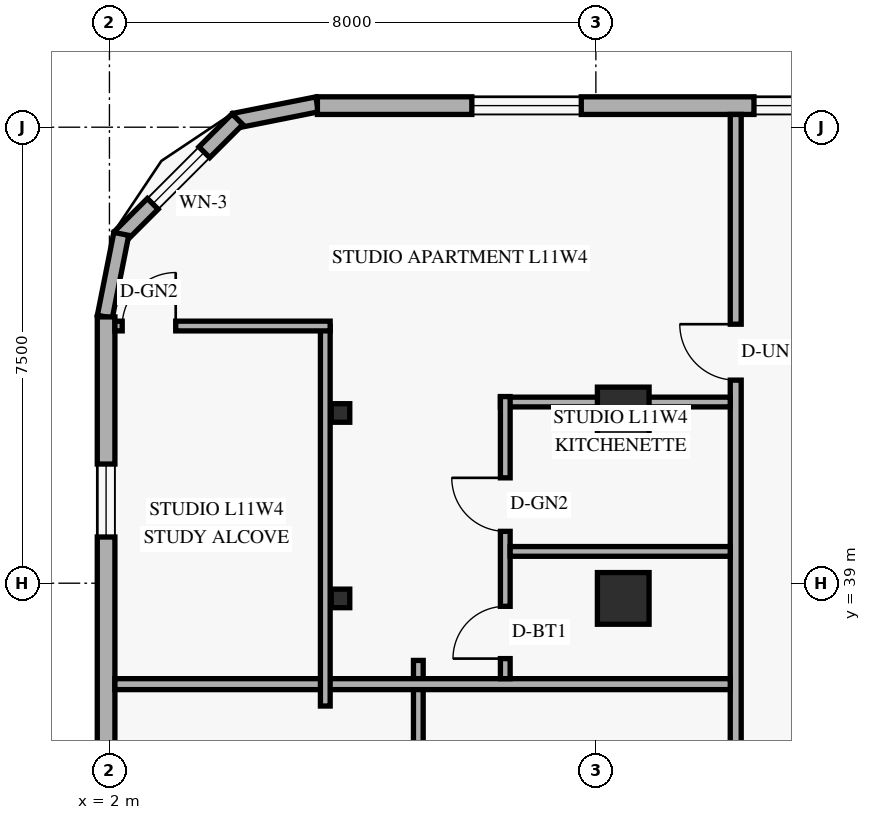
"""IFC4 building model, lengths in metres.
Left out: names, types, materials, properties, quantities, classifications, styles, units other than length and angle.
Written with IfcOpenShell. Run it as: python <this file> out.ifc"""

import sys

from ifc_helpers import new_model, si_unit, direction, frame, frame_2d, origin, origin_2d, place, context, subcontext, project, spatial, rectangle, hollow_rectangle, extrude, element, fill, save


model = new_model("IFC4")
c1 = context("Model", 3, precision=1e-05, world=origin(), true_north=direction((0.0, 1.0)))
c2 = subcontext(c1, "Body", "Model", "MODEL_VIEW")
j1 = project(units=[si_unit("LENGTHUNIT", "METRE"), si_unit("PLANEANGLEUNIT", "RADIAN")], contexts=[c1])
p1 = place(None, origin())
s1 = spatial("IfcSite", under=j1, at=p1, CompositionType="ELEMENT")
p2 = place(p1, origin())
s2 = spatial("IfcBuilding", under=s1, at=p2, CompositionType="ELEMENT")
p3 = place(p2, frame((0.0, 0.0, 45.6)))
s3 = spatial("IfcBuildingStorey", under=s2, at=p3, CompositionType="ELEMENT", Elevation=45.6)
for number, where, z_axis, x_axis in (
    (1, (5.8, 38.75, 0.0), (0.0, 0.0, 1.0), (1.0, 0.0, 0.0)),
    (2, (5.8, 41.8, 0.0), (0.0, 0.0, 1.0), (1.0, 0.0, 0.0)),
):
    element("IfcColumn", number, at=place(p3, frame(where, z_axis=z_axis, x_axis=x_axis)), inside=s3, PredefinedType="COLUMN", context=c2, shape_type="SweptSolid", body=[
        extrude(hollow_rectangle(XDim=0.305, YDim=0.305, WallThickness=0.013, at=origin_2d()), origin(), (0.0, 0.0, 1.0), 3.6),
    ])
for number, where, z_axis, x_axis in (
    (3, (10.45, 38.75, 0.0), (0.0, 0.0, 1.0), (1.0, 0.0, 0.0)),
    (4, (10.45, 41.8, 0.0), (0.0, 0.0, 1.0), (1.0, 0.0, 0.0)),
):
    element("IfcColumn", number, at=place(p3, frame(where, z_axis=z_axis, x_axis=x_axis)), inside=s3, PredefinedType="COLUMN", context=c2, shape_type="SweptSolid", body=[
        extrude(rectangle(XDim=0.85, YDim=0.85, at=origin_2d()), origin(), (0.0, 0.0, 1.0), 3.6),
    ])
p4 = place(p3, frame((5.417, 46.876, 0.0), z_axis=(0.0, 0.0, 1.0), x_axis=(-0.980809899341, -0.19496651342, 0.0)))
e5 = element("IfcWall", 5, at=p4, inside=s3, PredefinedType="SOLIDWALL", context=c2, shape_type="SweptSolid", body=[
    extrude(rectangle(XDim=1.389, YDim=0.25, at=frame_2d((0.694, 0.0))), origin(), (0.0, 0.0, 1.0), 3.36),
])
p5 = place(p3, frame((4.105, 46.632, 0.0), z_axis=(0.0, 0.0, 1.0), x_axis=(-0.707106781187, -0.707106781187, 0.0)))
e6 = element("IfcWall", 6, at=p5, inside=s3, PredefinedType="SOLIDWALL", context=c2, shape_type="SweptSolid", body=[
    extrude(rectangle(XDim=2.739, YDim=0.25, at=frame_2d((1.37, 0.0))), origin(), (0.0, 0.0, 1.0), 3.36),
])
p6 = place(p5, frame((0.77, 0.0, 0.85)))
e7 = element("IfcOpeningElement", 7, at=p6, cuts=e6, PredefinedType="OPENING", context=c2, shape_type="SweptSolid", body=[
    extrude(rectangle(XDim=1.2, YDim=1.5, at=frame_2d((0.6, 0.75))), frame((0.0, 0.135, 0.0), z_axis=(0.0, -1.0, 0.0), x_axis=(1.0, 0.0, 0.0)), (0.0, 0.0, 1.0), 0.27),
])
p7 = place(p3, frame((2.195, 44.746, 0.0), z_axis=(0.0, 0.0, 1.0), x_axis=(-0.19496651342, -0.980809899341, 0.0)))
e8 = element("IfcWall", 8, at=p7, inside=s3, PredefinedType="SOLIDWALL", context=c2, shape_type="SweptSolid", body=[
    extrude(rectangle(XDim=1.389, YDim=0.25, at=frame_2d((0.694, 0.0))), origin(), (0.0, 0.0, 1.0), 3.36),
])
p8 = place(p3, frame((44.98, 46.855, 0.0), z_axis=(0.0, 0.0, 1.0), x_axis=(-1.0, 0.0, 0.0)))
e9 = element("IfcWall", 9, at=p8, inside=s3, PredefinedType="SOLIDWALL", context=c2, shape_type="SweptSolid", body=[
    extrude(rectangle(XDim=39.56, YDim=0.29, at=frame_2d((19.78, 0.0))), origin(), (0.0, 0.0, 1.0), 3.36),
])
p9 = place(p8, frame((35.22, 0.0, 0.85)))
e10 = element("IfcOpeningElement", 10, at=p9, cuts=e9, PredefinedType="OPENING", context=c2, shape_type="SweptSolid", body=[
    extrude(rectangle(XDim=1.8, YDim=1.6, at=frame_2d((0.9, 0.8))), frame((0.0, 0.155, 0.0), z_axis=(0.0, -1.0, 0.0), x_axis=(1.0, 0.0, 0.0)), (0.0, 0.0, 1.0), 0.31),
])
p10 = place(p8, frame((31.18, 0.0, 0.85)))
e11 = element("IfcOpeningElement", 11, at=p10, cuts=e9, PredefinedType="OPENING", context=c2, shape_type="SweptSolid", body=[
    extrude(rectangle(XDim=1.2, YDim=1.5, at=frame_2d((0.6, 0.75))), frame((0.0, 0.155, 0.0), z_axis=(0.0, -1.0, 0.0), x_axis=(1.0, 0.0, 0.0)), (0.0, 0.0, 1.0), 0.31),
])
p11 = place(p8, frame((24.863, 0.0, 0.85)))
e12 = element("IfcOpeningElement", 12, at=p11, cuts=e9, PredefinedType="OPENING", context=c2, shape_type="SweptSolid", body=[
    extrude(rectangle(XDim=1.8, YDim=1.6, at=frame_2d((0.9, 0.8))), frame((0.0, 0.155, 0.0), z_axis=(0.0, -1.0, 0.0), x_axis=(1.0, 0.0, 0.0)), (0.0, 0.0, 1.0), 0.31),
])
p12 = place(p8, frame((16.273, 0.0, 0.85)))
e13 = element("IfcOpeningElement", 13, at=p12, cuts=e9, PredefinedType="OPENING", context=c2, shape_type="SweptSolid", body=[
    extrude(rectangle(XDim=1.8, YDim=1.6, at=frame_2d((0.9, 0.8))), frame((0.0, 0.155, 0.0), z_axis=(0.0, -1.0, 0.0), x_axis=(1.0, 0.0, 0.0)), (0.0, 0.0, 1.0), 0.31),
])
p13 = place(p8, frame((10.73, 0.0, 0.85)))
e14 = element("IfcOpeningElement", 14, at=p13, cuts=e9, PredefinedType="OPENING", context=c2, shape_type="SweptSolid", body=[
    extrude(rectangle(XDim=1.8, YDim=1.6, at=frame_2d((0.9, 0.8))), frame((0.0, 0.155, 0.0), z_axis=(0.0, -1.0, 0.0), x_axis=(1.0, 0.0, 0.0)), (0.0, 0.0, 1.0), 0.31),
])
p14 = place(p8, frame((7.895, 0.0, 0.85)))
e15 = element("IfcOpeningElement", 15, at=p14, cuts=e9, PredefinedType="OPENING", context=c2, shape_type="SweptSolid", body=[
    extrude(rectangle(XDim=1.2, YDim=1.5, at=frame_2d((0.6, 0.75))), frame((0.0, 0.155, 0.0), z_axis=(0.0, -1.0, 0.0), x_axis=(1.0, 0.0, 0.0)), (0.0, 0.0, 1.0), 0.31),
])
p15 = place(p8, frame((3.782, 0.0, 0.85)))
e16 = element("IfcOpeningElement", 16, at=p15, cuts=e9, PredefinedType="OPENING", context=c2, shape_type="SweptSolid", body=[
    extrude(rectangle(XDim=1.8, YDim=1.6, at=frame_2d((0.9, 0.8))), frame((0.0, 0.155, 0.0), z_axis=(0.0, -1.0, 0.0), x_axis=(1.0, 0.0, 0.0)), (0.0, 0.0, 1.0), 0.31),
])
p16 = place(p8, frame((0.367, 0.0, 0.85)))
e17 = element("IfcOpeningElement", 17, at=p16, cuts=e9, PredefinedType="OPENING", context=c2, shape_type="SweptSolid", body=[
    extrude(rectangle(XDim=1.2, YDim=1.5, at=frame_2d((0.6, 0.75))), frame((0.0, 0.155, 0.0), z_axis=(0.0, -1.0, 0.0), x_axis=(1.0, 0.0, 0.0)), (0.0, 0.0, 1.0), 0.31),
])
p17 = place(p3, frame((1.945, 43.38, 0.0), z_axis=(0.0, 0.0, 1.0), x_axis=(0.0, -1.0, 0.0)))
e18 = element("IfcWall", 18, at=p17, inside=s3, PredefinedType="SOLIDWALL", context=c2, shape_type="SweptSolid", body=[
    extrude(rectangle(XDim=38.76, YDim=0.29, at=frame_2d((19.38, 0.0))), origin(), (0.0, 0.0, 1.0), 3.36),
])
p18 = place(p17, frame((34.22, 0.0, 0.85)))
e19 = element("IfcOpeningElement", 19, at=p18, cuts=e18, PredefinedType="OPENING", context=c2, shape_type="SweptSolid", body=[
    extrude(rectangle(XDim=1.2, YDim=1.5, at=frame_2d((0.6, 0.75))), frame((0.0, 0.155, 0.0), z_axis=(0.0, -1.0, 0.0), x_axis=(1.0, 0.0, 0.0)), (0.0, 0.0, 1.0), 0.31),
])
p19 = place(p17, frame((29.035, 0.0, 0.85)))
e20 = element("IfcOpeningElement", 20, at=p19, cuts=e18, PredefinedType="OPENING", context=c2, shape_type="SweptSolid", body=[
    extrude(rectangle(XDim=1.2, YDim=1.5, at=frame_2d((0.6, 0.75))), frame((0.0, 0.155, 0.0), z_axis=(0.0, -1.0, 0.0), x_axis=(1.0, 0.0, 0.0)), (0.0, 0.0, 1.0), 0.31),
])
p20 = place(p17, frame((24.415, 0.0, 0.85)))
e21 = element("IfcOpeningElement", 21, at=p20, cuts=e18, PredefinedType="OPENING", context=c2, shape_type="SweptSolid", body=[
    extrude(rectangle(XDim=1.2, YDim=1.5, at=frame_2d((0.6, 0.75))), frame((0.0, 0.155, 0.0), z_axis=(0.0, -1.0, 0.0), x_axis=(1.0, 0.0, 0.0)), (0.0, 0.0, 1.0), 0.31),
])
p21 = place(p17, frame((19.22, 0.0, 0.85)))
e22 = element("IfcOpeningElement", 22, at=p21, cuts=e18, PredefinedType="OPENING", context=c2, shape_type="SweptSolid", body=[
    extrude(rectangle(XDim=1.2, YDim=1.5, at=frame_2d((0.6, 0.75))), frame((0.0, 0.155, 0.0), z_axis=(0.0, -1.0, 0.0), x_axis=(1.0, 0.0, 0.0)), (0.0, 0.0, 1.0), 0.31),
])
p22 = place(p17, frame((13.415, 0.0, 0.85)))
e23 = element("IfcOpeningElement", 23, at=p22, cuts=e18, PredefinedType="OPENING", context=c2, shape_type="SweptSolid", body=[
    extrude(rectangle(XDim=1.2, YDim=1.5, at=frame_2d((0.6, 0.75))), frame((0.0, 0.155, 0.0), z_axis=(0.0, -1.0, 0.0), x_axis=(1.0, 0.0, 0.0)), (0.0, 0.0, 1.0), 0.31),
])
p23 = place(p17, frame((7.435, 0.0, 0.85)))
e24 = element("IfcOpeningElement", 24, at=p23, cuts=e18, PredefinedType="OPENING", context=c2, shape_type="SweptSolid", body=[
    extrude(rectangle(XDim=1.2, YDim=1.5, at=frame_2d((0.6, 0.75))), frame((0.0, 0.155, 0.0), z_axis=(0.0, -1.0, 0.0), x_axis=(1.0, 0.0, 0.0)), (0.0, 0.0, 1.0), 0.31),
])
p24 = place(p17, frame((2.42, 0.0, 0.85)))
e25 = element("IfcOpeningElement", 25, at=p24, cuts=e18, PredefinedType="OPENING", context=c2, shape_type="SweptSolid", body=[
    extrude(rectangle(XDim=1.2, YDim=1.5, at=frame_2d((0.6, 0.75))), frame((0.0, 0.155, 0.0), z_axis=(0.0, -1.0, 0.0), x_axis=(1.0, 0.0, 0.0)), (0.0, 0.0, 1.0), 0.31),
])
p25 = place(p3, frame((12.3, 1.29, 0.0), z_axis=(0.0, 0.0, 1.0), x_axis=(0.0, 1.0, 0.0)))
e26 = element("IfcWall", 26, at=p25, inside=s3, PredefinedType="STANDARD", context=c2, shape_type="SweptSolid", body=[
    extrude(rectangle(XDim=45.42, YDim=0.18, at=frame_2d((22.71, 0.0))), origin(), (0.0, 0.0, 1.0), 2.649),
])
p26 = place(p25, frame((5.27, 0.0, 0.0)))
e27 = element("IfcOpeningElement", 27, at=p26, cuts=e26, PredefinedType="OPENING", context=c2, shape_type="SweptSolid", body=[
    extrude(rectangle(XDim=0.92, YDim=2.15, at=frame_2d((0.46, 1.075))), frame((0.0, 0.1, 0.0), z_axis=(0.0, -1.0, 0.0), x_axis=(1.0, 0.0, 0.0)), (0.0, 0.0, 1.0), 0.2),
])
p27 = place(p25, frame((14.5, 0.0, 0.0)))
e28 = element("IfcOpeningElement", 28, at=p27, cuts=e26, PredefinedType="OPENING", context=c2, shape_type="SweptSolid", body=[
    extrude(rectangle(XDim=0.92, YDim=2.15, at=frame_2d((0.46, 1.075))), frame((0.0, 0.1, 0.0), z_axis=(0.0, -1.0, 0.0), x_axis=(1.0, 0.0, 0.0)), (0.0, 0.0, 1.0), 0.2),
])
p28 = place(p25, frame((26.082, 0.0, 0.0)))
e29 = element("IfcOpeningElement", 29, at=p28, cuts=e26, PredefinedType="OPENING", context=c2, shape_type="SweptSolid", body=[
    extrude(rectangle(XDim=0.92, YDim=2.15, at=frame_2d((0.46, 1.075))), frame((0.0, 0.1, 0.0), z_axis=(0.0, -1.0, 0.0), x_axis=(1.0, 0.0, 0.0)), (0.0, 0.0, 1.0), 0.2),
])
p29 = place(p25, frame((41.05, 0.0, 0.0)))
e30 = element("IfcOpeningElement", 30, at=p29, cuts=e26, PredefinedType="OPENING", context=c2, shape_type="SweptSolid", body=[
    extrude(rectangle(XDim=0.92, YDim=2.15, at=frame_2d((0.46, 1.075))), frame((0.0, 0.1, 0.0), z_axis=(0.0, -1.0, 0.0), x_axis=(1.0, 0.0, 0.0)), (0.0, 0.0, 1.0), 0.2),
])
p30 = place(p3, frame((7.08, 33.27, 0.0), z_axis=(0.0, 0.0, 1.0), x_axis=(0.0, 1.0, 0.0)))
e31 = element("IfcWall", 31, at=p30, inside=s3, PredefinedType="PARTITIONING", context=c2, shape_type="SweptSolid", body=[
    extrude(rectangle(XDim=4.46, YDim=0.16, at=frame_2d((2.23, 0.0))), origin(), (0.0, 0.0, 1.0), 2.932),
])
p31 = place(p3, frame((2.09, 37.34, 0.0), z_axis=(0.0, 0.0, 1.0), x_axis=(1.0, 0.0, 0.0)))
e32 = element("IfcWall", 32, at=p31, inside=s3, PredefinedType="PARTITIONING", context=c2, shape_type="SweptSolid", body=[
    extrude(rectangle(XDim=10.12, YDim=0.18, at=frame_2d((5.06, 0.0))), origin(), (0.0, 0.0, 1.0), 2.649),
])
p32 = place(p3, frame((8.43, 41.98, 0.0), z_axis=(0.0, 0.0, 1.0), x_axis=(1.0, 0.0, 0.0)))
e33 = element("IfcWall", 33, at=p32, inside=s3, PredefinedType="PLUMBINGWALL", context=c2, shape_type="SweptSolid", body=[
    extrude(rectangle(XDim=3.78, YDim=0.16, at=frame_2d((1.89, 0.0))), origin(), (0.0, 0.0, 1.0), 2.809),
])
p33 = place(p3, frame((8.51, 37.43, 0.0), z_axis=(0.0, 0.0, 1.0), x_axis=(0.0, 1.0, 0.0)))
e34 = element("IfcWall", 34, at=p33, inside=s3, PredefinedType="PLUMBINGWALL", context=c2, shape_type="SweptSolid", body=[
    extrude(rectangle(XDim=4.64, YDim=0.16, at=frame_2d((2.32, 0.0))), origin(), (0.0, 0.0, 1.0), 2.649),
])
p34 = place(p33, frame((0.33, 0.0, 0.0)))
e35 = element("IfcOpeningElement", 35, at=p34, cuts=e34, PredefinedType="OPENING", context=c2, shape_type="SweptSolid", body=[
    extrude(rectangle(XDim=0.86, YDim=2.12, at=frame_2d((0.43, 1.06))), frame((0.0, 0.09, 0.0), z_axis=(0.0, -1.0, 0.0), x_axis=(1.0, 0.0, 0.0)), (0.0, 0.0, 1.0), 0.18),
])
p35 = place(p33, frame((2.423, 0.0, 0.0)))
e36 = element("IfcOpeningElement", 36, at=p35, cuts=e34, PredefinedType="OPENING", context=c2, shape_type="SweptSolid", body=[
    extrude(rectangle(XDim=0.88, YDim=2.12, at=frame_2d((0.44, 1.06))), frame((0.0, 0.09, 0.0), z_axis=(0.0, -1.0, 0.0), x_axis=(1.0, 0.0, 0.0)), (0.0, 0.0, 1.0), 0.18),
])
p36 = place(p3, frame((8.59, 39.523, 0.0), z_axis=(0.0, 0.0, 1.0), x_axis=(1.0, 0.0, 0.0)))
e37 = element("IfcWall", 37, at=p36, inside=s3, PredefinedType="PLUMBINGWALL", context=c2, shape_type="SweptSolid", body=[
    extrude(rectangle(XDim=3.62, YDim=0.16, at=frame_2d((1.81, 0.0))), origin(), (0.0, 0.0, 1.0), 2.649),
])
p37 = place(p3, frame((5.55, 36.98, 0.0), z_axis=(0.0, 0.0, 1.0), x_axis=(0.0, 1.0, 0.0)))
e38 = element("IfcWall", 38, at=p37, inside=s3, PredefinedType="PARTITIONING", context=c2, shape_type="SweptSolid", body=[
    extrude(rectangle(XDim=6.25, YDim=0.16, at=frame_2d((3.125, 0.0))), origin(), (0.0, 0.0, 1.0), 3.36),
])
p38 = place(p3, frame((2.09, 43.23, 0.0), z_axis=(0.0, 0.0, 1.0), x_axis=(1.0, 0.0, 0.0)))
e39 = element("IfcWall", 39, at=p38, inside=s3, PredefinedType="PARTITIONING", context=c2, shape_type="SweptSolid", body=[
    extrude(rectangle(XDim=3.54, YDim=0.16, at=frame_2d((1.77, 0.0))), origin(), (0.0, 0.0, 1.0), 3.36),
])
p39 = place(p38, frame((0.12, 0.0, 0.0)))
e40 = element("IfcOpeningElement", 40, at=p39, cuts=e39, PredefinedType="OPENING", context=c2, shape_type="SweptSolid", body=[
    extrude(rectangle(XDim=0.88, YDim=2.12, at=frame_2d((0.44, 1.06))), frame((0.0, 0.09, 0.0), z_axis=(0.0, -1.0, 0.0), x_axis=(1.0, 0.0, 0.0)), (0.0, 0.0, 1.0), 0.18),
])
p40 = place(p6, origin())
e41 = element("IfcWindow", 41, at=p40, inside=s3, PartitioningType="SINGLE_PANEL", PredefinedType="WINDOW", context=c2, shape_type="SweptSolid", body=[
    extrude(rectangle(XDim=1.2, YDim=1.5, at=frame_2d((0.6, 0.75))), frame((0.0, 0.03, 0.0), z_axis=(0.0, -1.0, 0.0), x_axis=(1.0, 0.0, 0.0)), (0.0, 0.0, 1.0), 0.06),
])
fill(e7, e41)
p41 = place(p9, origin())
e42 = element("IfcWindow", 42, at=p41, inside=s3, PartitioningType="SINGLE_PANEL", PredefinedType="WINDOW", context=c2, shape_type="SweptSolid", body=[
    extrude(rectangle(XDim=1.8, YDim=1.6, at=frame_2d((0.9, 0.8))), frame((0.0, 0.03, 0.0), z_axis=(0.0, -1.0, 0.0), x_axis=(1.0, 0.0, 0.0)), (0.0, 0.0, 1.0), 0.06),
])
fill(e10, e42)
p42 = place(p10, origin())
e43 = element("IfcWindow", 43, at=p42, inside=s3, PartitioningType="SINGLE_PANEL", PredefinedType="WINDOW", context=c2, shape_type="SweptSolid", body=[
    extrude(rectangle(XDim=1.2, YDim=1.5, at=frame_2d((0.6, 0.75))), frame((0.0, 0.03, 0.0), z_axis=(0.0, -1.0, 0.0), x_axis=(1.0, 0.0, 0.0)), (0.0, 0.0, 1.0), 0.06),
])
fill(e11, e43)
p43 = place(p24, origin())
e44 = element("IfcWindow", 44, at=p43, inside=s3, PartitioningType="SINGLE_PANEL", PredefinedType="WINDOW", context=c2, shape_type="SweptSolid", body=[
    extrude(rectangle(XDim=1.2, YDim=1.5, at=frame_2d((0.6, 0.75))), frame((0.0, 0.03, 0.0), z_axis=(0.0, -1.0, 0.0), x_axis=(1.0, 0.0, 0.0)), (0.0, 0.0, 1.0), 0.06),
])
fill(e25, e44)
p44 = place(p39, frame((0.88, 0.0, 0.0), z_axis=(0.0, 0.0, 1.0), x_axis=(-1.0, 0.0, 0.0)))
e45 = element("IfcDoor", 45, at=p44, inside=s3, OperationType="SINGLE_SWING_LEFT", PredefinedType="DOOR", context=c2, shape_type="SweptSolid", body=[
    extrude(rectangle(XDim=0.88, YDim=2.12, at=frame_2d((0.44, 1.06))), frame((0.0, 0.025, 0.0), z_axis=(0.0, -1.0, 0.0), x_axis=(1.0, 0.0, 0.0)), (0.0, 0.0, 1.0), 0.05),
])
fill(e40, e45)
p45 = place(p29, origin())
e46 = element("IfcDoor", 46, at=p45, inside=s3, OperationType="SINGLE_SWING_RIGHT", PredefinedType="DOOR", context=c2, shape_type="SweptSolid", body=[
    extrude(rectangle(XDim=0.92, YDim=2.15, at=frame_2d((0.46, 1.075))), frame((0.0, 0.025, 0.0), z_axis=(0.0, -1.0, 0.0), x_axis=(1.0, 0.0, 0.0)), (0.0, 0.0, 1.0), 0.05),
])
fill(e30, e46)
p46 = place(p34, origin())
e47 = element("IfcDoor", 47, at=p46, inside=s3, OperationType="SINGLE_SWING_LEFT", PredefinedType="DOOR", context=c2, shape_type="SweptSolid", body=[
    extrude(rectangle(XDim=0.86, YDim=2.12, at=frame_2d((0.43, 1.06))), frame((0.0, 0.025, 0.0), z_axis=(0.0, -1.0, 0.0), x_axis=(1.0, 0.0, 0.0)), (0.0, 0.0, 1.0), 0.05),
])
fill(e35, e47)
p47 = place(p35, origin())
e48 = element("IfcDoor", 48, at=p47, inside=s3, OperationType="SINGLE_SWING_RIGHT", PredefinedType="DOOR", context=c2, shape_type="SweptSolid", body=[
    extrude(rectangle(XDim=0.88, YDim=2.12, at=frame_2d((0.44, 1.06))), frame((0.0, 0.025, 0.0), z_axis=(0.0, -1.0, 0.0), x_axis=(1.0, 0.0, 0.0)), (0.0, 0.0, 1.0), 0.05),
])
fill(e36, e48)
save(model, sys.argv[1])
